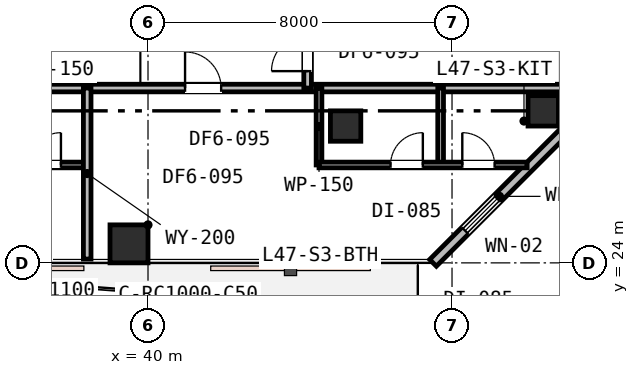
"""IFC4 building model, lengths in metres.
Left out: names, types, materials, properties, quantities, classifications, styles, units other than length and angle.
Written with IfcOpenShell. Run it as: python <this file> out.ifc"""

import sys

from ifc_helpers import new_model, si_unit, direction, frame, frame_2d, origin, origin_2d, place, context, subcontext, project, spatial, rectangle, extrude, element, fill, save


model = new_model("IFC4")
c1 = context("Model", 3, precision=1e-05, world=origin(), true_north=direction((0.0, 1.0)))
c2 = subcontext(c1, "Body", "Model", "MODEL_VIEW")
j1 = project(units=[si_unit("LENGTHUNIT", "METRE"), si_unit("PLANEANGLEUNIT", "RADIAN")], contexts=[c1])
p1 = place(None, origin())
s1 = spatial("IfcSite", under=j1, at=p1, CompositionType="ELEMENT")
p2 = place(p1, origin())
s2 = spatial("IfcBuilding", under=s1, at=p2, CompositionType="ELEMENT")
p3 = place(p2, frame((0.0, 0.0, 183.0)))
s3 = spatial("IfcBuildingStorey", under=s2, at=p3, CompositionType="ELEMENT", Elevation=183.0)
p4 = place(p3, frame((39.5, 24.5, 0.0), z_axis=(0.0, 0.0, 1.0), x_axis=(1.0, 0.0, 0.0)))
e1 = element("IfcColumn", 1, at=p4, inside=s3, PredefinedType="COLUMN", context=c2, shape_type="SweptSolid", body=[
    extrude(rectangle(XDim=1.0, YDim=1.0, at=origin_2d()), origin(), (0.0, 0.0, 1.0), 3.6),
])
for number, where, z_axis, x_axis in (
    (2, (45.2, 27.6, 0.0), (0.0, 0.0, 1.0), (1.0, 0.0, 0.0)),
    (3, (50.4, 28.0, 0.0), (0.0, 0.0, 1.0), (1.0, 0.0, 0.0)),
):
    element("IfcColumn", number, at=place(p3, frame(where, z_axis=z_axis, x_axis=x_axis)), inside=s3, PredefinedType="COLUMN", context=c2, shape_type="SweptSolid", body=[
        extrude(rectangle(XDim=0.8, YDim=0.8, at=origin_2d()), origin(), (0.0, 0.0, 1.0), 3.6),
    ])
p5 = place(p3, frame((47.5, 24.0, 0.0), z_axis=(0.0, 0.0, 1.0), x_axis=(0.707106781187, 0.707106781187, 0.0)))
e4 = element("IfcWall", 4, at=p5, inside=s3, PredefinedType="STANDARD", context=c2, shape_type="SweptSolid", body=[
    extrude(rectangle(XDim=4.95, YDim=0.25, at=frame_2d((2.475, 0.0))), origin(), (0.0, 0.0, 1.0), 3.33),
])
p6 = place(p5, frame((1.196, 0.0, 0.85)))
e5 = element("IfcOpeningElement", 5, at=p6, cuts=e4, PredefinedType="OPENING", context=c2, shape_type="SweptSolid", body=[
    extrude(rectangle(XDim=1.2, YDim=1.6, at=frame_2d((0.6, 0.8))), frame((0.0, 0.135, 0.0), z_axis=(0.0, -1.0, 0.0), x_axis=(1.0, 0.0, 0.0)), (0.0, 0.0, 1.0), 0.27),
])
p7 = place(p3, frame((21.6, 28.6, 0.0), z_axis=(0.0, 0.0, 1.0), x_axis=(1.0, 0.0, 0.0)))
e6 = element("IfcWall", 6, at=p7, inside=s3, PredefinedType="PARTITIONING", context=c2, shape_type="SweptSolid", body=[
    extrude(rectangle(XDim=29.3, YDim=0.2, at=frame_2d((14.65, 0.0))), origin(), (0.0, 0.0, 1.0), 2.92),
])
p8 = place(p7, frame((3.293, 0.0, 0.0)))
e7 = element("IfcOpeningElement", 7, at=p8, cuts=e6, PredefinedType="OPENING", context=c2, shape_type="SweptSolid", body=[
    extrude(rectangle(XDim=0.95, YDim=2.15, at=frame_2d((0.475, 1.075))), frame((0.0, 0.11, 0.0), z_axis=(0.0, -1.0, 0.0), x_axis=(1.0, 0.0, 0.0)), (0.0, 0.0, 1.0), 0.22),
])
p9 = place(p7, frame((10.493, 0.0, 0.0)))
e8 = element("IfcOpeningElement", 8, at=p9, cuts=e6, PredefinedType="OPENING", context=c2, shape_type="SweptSolid", body=[
    extrude(rectangle(XDim=0.95, YDim=2.15, at=frame_2d((0.475, 1.075))), frame((0.0, 0.11, 0.0), z_axis=(0.0, -1.0, 0.0), x_axis=(1.0, 0.0, 0.0)), (0.0, 0.0, 1.0), 0.22),
])
p10 = place(p7, frame((19.375, 0.0, 0.0)))
e9 = element("IfcOpeningElement", 9, at=p10, cuts=e6, PredefinedType="OPENING", context=c2, shape_type="SweptSolid", body=[
    extrude(rectangle(XDim=0.95, YDim=2.15, at=frame_2d((0.475, 1.075))), frame((0.0, 0.11, 0.0), z_axis=(0.0, -1.0, 0.0), x_axis=(1.0, 0.0, 0.0)), (0.0, 0.0, 1.0), 0.22),
])
p11 = place(p3, frame((44.2, 28.6, 0.0), z_axis=(0.0, 0.0, 1.0), x_axis=(0.0, 1.0, 0.0)))
e10 = element("IfcWall", 10, at=p11, inside=s3, PredefinedType="PARTITIONING", context=c2, shape_type="SweptSolid", body=[
    extrude(rectangle(XDim=14.3, YDim=0.2, at=frame_2d((7.15, 0.0))), origin(), (0.0, 0.0, 1.0), 2.92),
])
p12 = place(p11, frame((0.445, 0.0, 0.0)))
e11 = element("IfcOpeningElement", 11, at=p12, cuts=e10, PredefinedType="OPENING", context=c2, shape_type="SweptSolid", body=[
    extrude(rectangle(XDim=0.95, YDim=2.15, at=frame_2d((0.475, 1.075))), frame((0.0, 0.11, 0.0), z_axis=(0.0, -1.0, 0.0), x_axis=(1.0, 0.0, 0.0)), (0.0, 0.0, 1.0), 0.22),
])
p13 = place(p3, frame((33.936, 26.576, 0.0), z_axis=(0.0, 0.0, 1.0), x_axis=(1.0, 0.0, 0.0)))
e12 = element("IfcWall", 12, at=p13, inside=s3, PredefinedType="PARTITIONING", context=c2, shape_type="SweptSolid", body=[
    extrude(rectangle(XDim=4.464, YDim=0.15, at=frame_2d((2.232, 0.0))), origin(), (0.0, 0.0, 1.0), 3.07),
])
p14 = place(p13, frame((0.691, 0.0, 0.0)))
e13 = element("IfcOpeningElement", 13, at=p14, cuts=e12, PredefinedType="OPENING", context=c2, shape_type="SweptSolid", body=[
    extrude(rectangle(XDim=0.85, YDim=2.15, at=frame_2d((0.425, 1.075))), frame((0.0, 0.085, 0.0), z_axis=(0.0, -1.0, 0.0), x_axis=(1.0, 0.0, 0.0)), (0.0, 0.0, 1.0), 0.17),
])
p15 = place(p13, frame((2.923, 0.0, 0.0)))
e14 = element("IfcOpeningElement", 14, at=p15, cuts=e12, PredefinedType="OPENING", context=c2, shape_type="SweptSolid", body=[
    extrude(rectangle(XDim=0.85, YDim=2.15, at=frame_2d((0.425, 1.075))), frame((0.0, 0.085, 0.0), z_axis=(0.0, -1.0, 0.0), x_axis=(1.0, 0.0, 0.0)), (0.0, 0.0, 1.0), 0.17),
])
p16 = place(p3, frame((38.4, 24.1, 0.0), z_axis=(0.0, 0.0, 1.0), x_axis=(0.0, 1.0, 0.0)))
e15 = element("IfcWall", 15, at=p16, inside=s3, PredefinedType="PARTITIONING", context=c2, shape_type="SweptSolid", body=[
    extrude(rectangle(XDim=4.5, YDim=0.2, at=frame_2d((2.25, 0.0))), origin(), (0.0, 0.0, 1.0), 3.02),
])
for number, where, z_axis, x_axis in (
    (16, (44.5, 26.576, 0.0), (0.0, 0.0, 1.0), (0.0, 1.0, 0.0)),
    (17, (47.7, 26.576, 0.0), (0.0, 0.0, 1.0), (0.0, 1.0, 0.0)),
):
    element("IfcWall", number, at=place(p3, frame(where, z_axis=z_axis, x_axis=x_axis)), inside=s3, PredefinedType="PARTITIONING", context=c2, shape_type="SweptSolid", body=[
        extrude(rectangle(XDim=2.024, YDim=0.15, at=frame_2d((1.012, 0.0))), origin(), (0.0, 0.0, 1.0), 3.33),
    ])
p17 = place(p3, frame((44.5, 26.576, 0.0), z_axis=(0.0, 0.0, 1.0), x_axis=(1.0, 0.0, 0.0)))
e18 = element("IfcWall", 18, at=p17, inside=s3, PredefinedType="PARTITIONING", context=c2, shape_type="SweptSolid", body=[
    extrude(rectangle(XDim=5.476, YDim=0.15, at=frame_2d((2.738, 0.0))), origin(), (0.0, 0.0, 1.0), 3.33),
])
p18 = place(p17, frame((1.882, 0.0, 0.0)))
e19 = element("IfcOpeningElement", 19, at=p18, cuts=e18, PredefinedType="OPENING", context=c2, shape_type="SweptSolid", body=[
    extrude(rectangle(XDim=0.85, YDim=2.15, at=frame_2d((0.425, 1.075))), frame((0.0, 0.085, 0.0), z_axis=(0.0, -1.0, 0.0), x_axis=(1.0, 0.0, 0.0)), (0.0, 0.0, 1.0), 0.17),
])
p19 = place(p17, frame((3.77, 0.0, 0.0)))
e20 = element("IfcOpeningElement", 20, at=p19, cuts=e18, PredefinedType="OPENING", context=c2, shape_type="SweptSolid", body=[
    extrude(rectangle(XDim=0.85, YDim=2.15, at=frame_2d((0.425, 1.075))), frame((0.0, 0.085, 0.0), z_axis=(0.0, -1.0, 0.0), x_axis=(1.0, 0.0, 0.0)), (0.0, 0.0, 1.0), 0.17),
])
p20 = place(p6, origin())
e21 = element("IfcWindow", 21, at=p20, inside=s3, PartitioningType="SINGLE_PANEL", PredefinedType="WINDOW", context=c2, shape_type="SweptSolid", body=[
    extrude(rectangle(XDim=1.2, YDim=1.6, at=frame_2d((0.6, 0.8))), frame((0.0, 0.03, 0.0), z_axis=(0.0, -1.0, 0.0), x_axis=(1.0, 0.0, 0.0)), (0.0, 0.0, 1.0), 0.06),
])
fill(e5, e21)
p21 = place(p12, origin())
e22 = element("IfcDoor", 22, at=p21, inside=s3, OperationType="SINGLE_SWING_LEFT", PredefinedType="DOOR", context=c2, shape_type="SweptSolid", body=[
    extrude(rectangle(XDim=0.95, YDim=2.15, at=frame_2d((0.475, 1.075))), frame((0.0, 0.025, 0.0), z_axis=(0.0, -1.0, 0.0), x_axis=(1.0, 0.0, 0.0)), (0.0, 0.0, 1.0), 0.05),
])
fill(e11, e22)
p22 = place(p15, origin())
e23 = element("IfcDoor", 23, at=p22, inside=s3, OperationType="SINGLE_SWING_RIGHT", PredefinedType="DOOR", context=c2, shape_type="SweptSolid", body=[
    extrude(rectangle(XDim=0.85, YDim=2.15, at=frame_2d((0.425, 1.075))), frame((0.0, 0.025, 0.0), z_axis=(0.0, -1.0, 0.0), x_axis=(1.0, 0.0, 0.0)), (0.0, 0.0, 1.0), 0.05),
])
fill(e14, e23)
p23 = place(p10, origin())
e24 = element("IfcDoor", 24, at=p23, inside=s3, OperationType="SINGLE_SWING_LEFT", PredefinedType="DOOR", context=c2, shape_type="SweptSolid", body=[
    extrude(rectangle(XDim=0.95, YDim=2.15, at=frame_2d((0.475, 1.075))), frame((0.0, 0.025, 0.0), z_axis=(0.0, -1.0, 0.0), x_axis=(1.0, 0.0, 0.0)), (0.0, 0.0, 1.0), 0.05),
])
fill(e9, e24)
p24 = place(p18, origin())
e25 = element("IfcDoor", 25, at=p24, inside=s3, OperationType="SINGLE_SWING_RIGHT", PredefinedType="DOOR", context=c2, shape_type="SweptSolid", body=[
    extrude(rectangle(XDim=0.85, YDim=2.15, at=frame_2d((0.425, 1.075))), frame((0.0, 0.025, 0.0), z_axis=(0.0, -1.0, 0.0), x_axis=(1.0, 0.0, 0.0)), (0.0, 0.0, 1.0), 0.05),
])
fill(e19, e25)
p25 = place(p19, origin())
e26 = element("IfcDoor", 26, at=p25, inside=s3, OperationType="SINGLE_SWING_LEFT", PredefinedType="DOOR", context=c2, shape_type="SweptSolid", body=[
    extrude(rectangle(XDim=0.85, YDim=2.15, at=frame_2d((0.425, 1.075))), frame((0.0, 0.025, 0.0), z_axis=(0.0, -1.0, 0.0), x_axis=(1.0, 0.0, 0.0)), (0.0, 0.0, 1.0), 0.05),
])
fill(e20, e26)
save(model, sys.argv[1])
